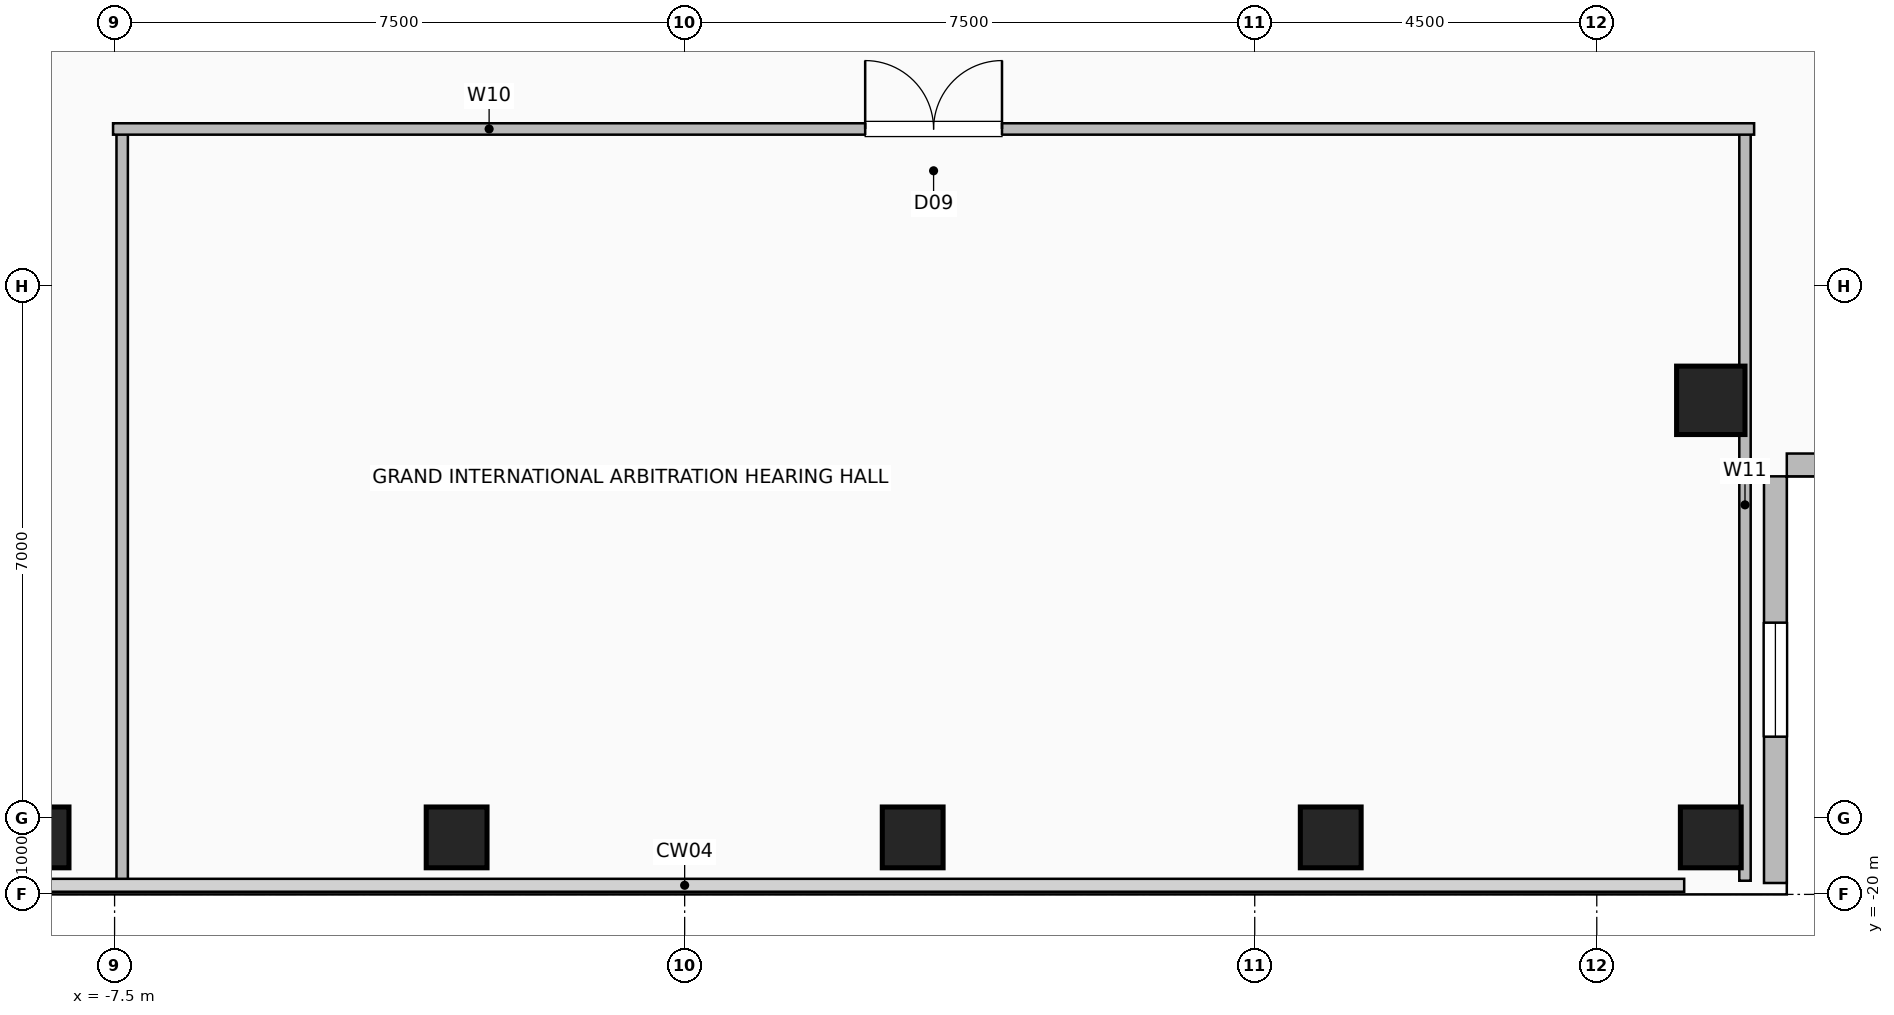
"""IFC4 building model, lengths in metres.
Left out: names, types, materials, properties, quantities, classifications, styles, units other than length and angle.
Written with IfcOpenShell. Run it as: python <this file> out.ifc"""

import sys

from ifc_helpers import new_model, si_unit, direction, frame, frame_2d, origin, origin_2d, place, context, subcontext, project, spatial, rectangle, hollow_rectangle, extrude, element, fill, save


model = new_model("IFC4")
c1 = context("Model", 3, precision=1e-05, world=origin(), true_north=direction((0.0, 1.0)))
c2 = subcontext(c1, "Body", "Model", "MODEL_VIEW")
j1 = project(units=[si_unit("LENGTHUNIT", "METRE"), si_unit("PLANEANGLEUNIT", "RADIAN")], contexts=[c1])
p1 = place(None, origin())
s1 = spatial("IfcSite", under=j1, at=p1, CompositionType="ELEMENT")
p2 = place(p1, origin())
s2 = spatial("IfcBuilding", under=s1, at=p2, CompositionType="ELEMENT")
p3 = place(p2, frame((0.0, 0.0, 187.8)))
s3 = spatial("IfcBuildingStorey", under=s2, at=p3, CompositionType="ELEMENT", Elevation=187.8)
for number, where, z_axis, x_axis in (
    (1, (-8.5, -19.25, 0.0), (0.0, 0.0, 1.0), (1.0, 0.0, 0.0)),
    (2, (-3.0, -19.25, 0.0), (0.0, 0.0, 1.0), (1.0, 0.0, 0.0)),
    (3, (3.0, -19.25, 0.0), (0.0, 0.0, 1.0), (1.0, 0.0, 0.0)),
    (4, (8.5, -19.25, 0.0), (0.0, 0.0, 1.0), (1.0, 0.0, 0.0)),
    (5, (13.5, -19.25, 0.0), (0.0, 0.0, 1.0), (1.0, 0.0, 0.0)),
):
    element("IfcColumn", number, at=place(p3, frame(where, z_axis=z_axis, x_axis=x_axis)), inside=s3, PredefinedType="COLUMN", context=c2, shape_type="SweptSolid", body=[
        extrude(hollow_rectangle(XDim=0.8, YDim=0.8, WallThickness=0.04, at=origin_2d()), origin(), (0.0, 0.0, 1.0), 3.6),
    ])
p4 = place(p3, frame((13.5, -13.5, 0.0), z_axis=(0.0, 0.0, 1.0), x_axis=(1.0, 0.0, 0.0)))
e6 = element("IfcColumn", 6, at=p4, inside=s3, PredefinedType="COLUMN", context=c2, shape_type="SweptSolid", body=[
    extrude(hollow_rectangle(XDim=0.9, YDim=0.9, WallThickness=0.045, at=origin_2d()), origin(), (0.0, 0.0, 1.0), 3.6),
])
p5 = place(p3, frame((14.35, -19.85, 0.0), z_axis=(0.0, 0.0, 1.0), x_axis=(0.0, 1.0, 0.0)))
e7 = element("IfcWall", 7, at=p5, inside=s3, PredefinedType="SOLIDWALL", context=c2, shape_type="SweptSolid", body=[
    extrude(rectangle(XDim=5.35, YDim=0.3, at=frame_2d((2.675, 0.0))), origin(), (0.0, 0.0, 1.0), 3.36),
])
p6 = place(p5, frame((1.925, 0.0, 0.9)))
e8 = element("IfcOpeningElement", 8, at=p6, cuts=e7, PredefinedType="OPENING", context=c2, shape_type="SweptSolid", body=[
    extrude(rectangle(XDim=1.5, YDim=1.8, at=frame_2d((0.75, 0.9))), frame((0.0, 0.16, 0.0), z_axis=(0.0, -1.0, 0.0), x_axis=(1.0, 0.0, 0.0)), (0.0, 0.0, 1.0), 0.32),
])
p7 = place(p3, frame((19.85, -14.35, 0.0), z_axis=(0.0, 0.0, 1.0), x_axis=(-1.0, 0.0, 0.0)))
e9 = element("IfcWall", 9, at=p7, inside=s3, PredefinedType="SOLIDWALL", context=c2, shape_type="SweptSolid", body=[
    extrude(rectangle(XDim=5.35, YDim=0.3, at=frame_2d((2.675, 0.0))), origin(), (0.0, 0.0, 1.0), 3.36),
])
for number, where, z_axis, x_axis in (
    (10, (-7.4, -19.82, 0.0), (0.0, 0.0, 1.0), (0.0, 1.0, 0.0)),
    (11, (13.95, -19.82, 0.0), (0.0, 0.0, 1.0), (0.0, 1.0, 0.0)),
):
    element("IfcWall", number, at=place(p3, frame(where, z_axis=z_axis, x_axis=x_axis)), inside=s3, PredefinedType="PARTITIONING", context=c2, shape_type="SweptSolid", body=[
        extrude(rectangle(XDim=9.89, YDim=0.15, at=frame_2d((4.945, 0.0))), origin(), (0.0, 0.0, 1.0), 3.36),
    ])
p8 = place(p3, frame((-7.52, -9.93, 0.0), z_axis=(0.0, 0.0, 1.0), x_axis=(1.0, 0.0, 0.0)))
e12 = element("IfcWall", 12, at=p8, inside=s3, PredefinedType="PARTITIONING", context=c2, shape_type="SweptSolid", body=[
    extrude(rectangle(XDim=21.59, YDim=0.15, at=frame_2d((10.795, 0.0))), origin(), (0.0, 0.0, 1.0), 3.36),
])
p9 = place(p8, frame((9.895, 0.0, 0.0)))
e13 = element("IfcOpeningElement", 13, at=p9, cuts=e12, PredefinedType="OPENING", context=c2, shape_type="SweptSolid", body=[
    extrude(rectangle(XDim=1.8, YDim=2.08, at=frame_2d((0.9, 1.04))), frame((0.0, 0.085, 0.0), z_axis=(0.0, -1.0, 0.0), x_axis=(1.0, 0.0, 0.0)), (0.0, 0.0, 1.0), 0.17),
])
p10 = place(p6, origin())
e14 = element("IfcWindow", 14, at=p10, inside=s3, PartitioningType="SINGLE_PANEL", PredefinedType="WINDOW", context=c2, shape_type="SweptSolid", body=[
    extrude(rectangle(XDim=1.5, YDim=1.8, at=frame_2d((0.75, 0.9))), frame((0.0, 0.03, 0.0), z_axis=(0.0, -1.0, 0.0), x_axis=(1.0, 0.0, 0.0)), (0.0, 0.0, 1.0), 0.06),
])
fill(e8, e14)
p11 = place(p9, origin())
e15 = element("IfcDoor", 15, at=p11, inside=s3, OperationType="DOUBLE_DOOR_SINGLE_SWING", PredefinedType="DOOR", context=c2, shape_type="SweptSolid", body=[
    extrude(rectangle(XDim=1.8, YDim=2.08, at=frame_2d((0.9, 1.04))), frame((0.0, 0.025, 0.0), z_axis=(0.0, -1.0, 0.0), x_axis=(1.0, 0.0, 0.0)), (0.0, 0.0, 1.0), 0.05),
])
fill(e13, e15)
save(model, sys.argv[1])
